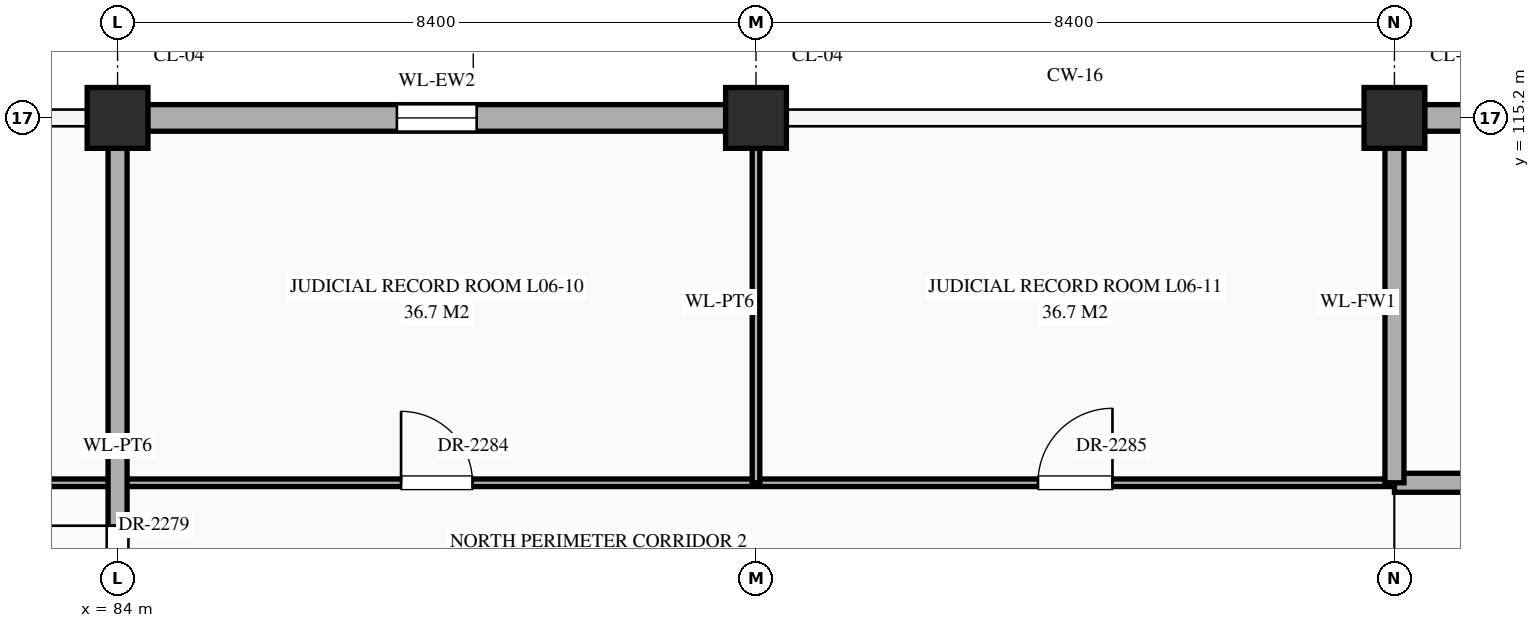
"""IFC4 building model, lengths in metres.
Left out: names, types, materials, properties, quantities, classifications, styles, units other than length and angle.
Written with IfcOpenShell. Run it as: python <this file> out.ifc"""

import sys

from ifc_helpers import new_model, si_unit, direction, frame, frame_2d, origin, origin_2d, place, context, subcontext, project, spatial, rectangle, extrude, element, fill, save


model = new_model("IFC4")
c1 = context("Model", 3, precision=1e-05, world=origin(), true_north=direction((0.0, 1.0)))
c2 = subcontext(c1, "Body", "Model", "MODEL_VIEW")
j1 = project(units=[si_unit("LENGTHUNIT", "METRE"), si_unit("PLANEANGLEUNIT", "RADIAN")], contexts=[c1])
p1 = place(None, origin())
s1 = spatial("IfcSite", under=j1, at=p1, CompositionType="ELEMENT")
p2 = place(p1, origin())
s2 = spatial("IfcBuilding", under=s1, at=p2, CompositionType="ELEMENT")
p3 = place(p2, frame((0.0, 0.0, 26.1)))
s3 = spatial("IfcBuildingStorey", under=s2, at=p3, CompositionType="ELEMENT", Elevation=26.1)
for number, where, z_axis, x_axis in (
    (1, (84.0, 115.2, 0.0), (0.0, 0.0, 1.0), (1.0, 0.0, 0.0)),
    (2, (92.4, 115.2, 0.0), (0.0, 0.0, 1.0), (1.0, 0.0, 0.0)),
    (3, (100.8, 115.2, 0.0), (0.0, 0.0, 1.0), (1.0, 0.0, 0.0)),
):
    element("IfcColumn", number, at=place(p3, frame(where, z_axis=z_axis, x_axis=x_axis)), inside=s3, PredefinedType="COLUMN", context=c2, shape_type="SweptSolid", body=[
        extrude(rectangle(XDim=0.8, YDim=0.8, at=origin_2d()), origin(), (0.0, 0.0, 1.0), 4.5),
    ])
p4 = place(p3, frame((84.395, 115.2, 0.0), z_axis=(0.0, 0.0, 1.0), x_axis=(1.0, 0.0, 0.0)))
e4 = element("IfcWall", 4, at=p4, inside=s3, PredefinedType="STANDARD", context=c2, shape_type="SweptSolid", body=[
    extrude(rectangle(XDim=7.61, YDim=0.35, at=frame_2d((3.805, 0.0))), origin(), (0.0, 0.0, 1.0), 3.59),
])
p5 = place(p4, frame((3.28, 0.0, 0.85)))
e5 = element("IfcOpeningElement", 5, at=p5, cuts=e4, PredefinedType="OPENING", context=c2, shape_type="SweptSolid", body=[
    extrude(rectangle(XDim=1.05, YDim=2.12, at=frame_2d((0.525, 1.06))), frame((0.0, 0.187, 0.0), z_axis=(0.0, -1.0, 0.0), x_axis=(1.0, 0.0, 0.0)), (0.0, 0.0, 1.0), 0.374),
])
p6 = place(p3, frame((101.195, 115.2, 0.0), z_axis=(0.0, 0.0, 1.0), x_axis=(1.0, 0.0, 0.0)))
e6 = element("IfcWall", 6, at=p6, inside=s3, PredefinedType="STANDARD", context=c2, shape_type="SweptSolid", body=[
    extrude(rectangle(XDim=7.61, YDim=0.35, at=frame_2d((3.805, 0.0))), origin(), (0.0, 0.0, 1.0), 3.59),
])
p7 = place(p3, frame((67.2, 110.4, 0.0), z_axis=(0.0, 0.0, 1.0), x_axis=(1.0, 0.0, 0.0)))
e7 = element("IfcWall", 7, at=p7, inside=s3, PredefinedType="STANDARD", context=c2, shape_type="SweptSolid", body=[
    extrude(rectangle(XDim=33.6, YDim=0.1, at=frame_2d((16.8, 0.0))), origin(), (0.0, 0.0, 1.0), 4.24),
])
p8 = place(p7, frame((3.58, 0.0, 0.0)))
e8 = element("IfcOpeningElement", 8, at=p8, cuts=e7, PredefinedType="OPENING", context=c2, shape_type="SweptSolid", body=[
    extrude(rectangle(XDim=1.24, YDim=2.3, at=frame_2d((0.62, 1.15))), frame((0.0, 0.062, 0.0), z_axis=(0.0, -1.0, 0.0), x_axis=(1.0, 0.0, 0.0)), (0.0, 0.0, 1.0), 0.124),
])
p9 = place(p7, frame((11.96, 0.0, 0.0)))
e9 = element("IfcOpeningElement", 9, at=p9, cuts=e7, PredefinedType="OPENING", context=c2, shape_type="SweptSolid", body=[
    extrude(rectangle(XDim=1.28, YDim=2.35, at=frame_2d((0.64, 1.175))), frame((0.0, 0.062, 0.0), z_axis=(0.0, -1.0, 0.0), x_axis=(1.0, 0.0, 0.0)), (0.0, 0.0, 1.0), 0.124),
])
p10 = place(p7, frame((20.53, 0.0, 0.0)))
e10 = element("IfcOpeningElement", 10, at=p10, cuts=e7, PredefinedType="OPENING", context=c2, shape_type="SweptSolid", body=[
    extrude(rectangle(XDim=0.94, YDim=2.3, at=frame_2d((0.47, 1.15))), frame((0.0, 0.062, 0.0), z_axis=(0.0, -1.0, 0.0), x_axis=(1.0, 0.0, 0.0)), (0.0, 0.0, 1.0), 0.124),
])
p11 = place(p7, frame((28.91, 0.0, 0.0)))
e11 = element("IfcOpeningElement", 11, at=p11, cuts=e7, PredefinedType="OPENING", context=c2, shape_type="SweptSolid", body=[
    extrude(rectangle(XDim=0.98, YDim=2.35, at=frame_2d((0.49, 1.175))), frame((0.0, 0.062, 0.0), z_axis=(0.0, -1.0, 0.0), x_axis=(1.0, 0.0, 0.0)), (0.0, 0.0, 1.0), 0.124),
])
p12 = place(p3, frame((100.8, 110.4, 0.0), z_axis=(0.0, 0.0, 1.0), x_axis=(1.0, 0.0, 0.0)))
e12 = element("IfcWall", 12, at=p12, inside=s3, PredefinedType="STANDARD", context=c2, shape_type="SweptSolid", body=[
    extrude(rectangle(XDim=8.4, YDim=0.25, at=frame_2d((4.2, 0.0))), origin(), (0.0, 0.0, 1.0), 4.24),
])
p13 = place(p12, frame((3.65, 0.0, 0.0)))
e13 = element("IfcOpeningElement", 13, at=p13, cuts=e12, PredefinedType="OPENING", context=c2, shape_type="SweptSolid", body=[
    extrude(rectangle(XDim=1.1, YDim=2.2, at=frame_2d((0.55, 1.1))), frame((0.0, 0.137, 0.0), z_axis=(0.0, -1.0, 0.0), x_axis=(1.0, 0.0, 0.0)), (0.0, 0.0, 1.0), 0.274),
])
p14 = place(p3, frame((84.0, 79.24, 0.0), z_axis=(0.0, 0.0, 1.0), x_axis=(0.0, 1.0, 0.0)))
e14 = element("IfcWall", 14, at=p14, inside=s3, PredefinedType="STANDARD", context=c2, shape_type="SweptSolid", body=[
    extrude(rectangle(XDim=35.92, YDim=0.25, at=frame_2d((17.96, 0.0))), origin(), (0.0, 0.0, 1.0), 3.49),
])
p15 = place(p14, frame((22.62, 0.0, 0.0)))
e15 = element("IfcOpeningElement", 15, at=p15, cuts=e14, PredefinedType="OPENING", context=c2, shape_type="SweptSolid", body=[
    extrude(rectangle(XDim=1.8, YDim=2.35, at=frame_2d((0.9, 1.175))), frame((0.0, 0.137, 0.0), z_axis=(0.0, -1.0, 0.0), x_axis=(1.0, 0.0, 0.0)), (0.0, 0.0, 1.0), 0.274),
])
p16 = place(p14, frame((12.5, 0.0, 0.0)))
e16 = element("IfcOpeningElement", 16, at=p16, cuts=e14, PredefinedType="OPENING", context=c2, shape_type="SweptSolid", body=[
    extrude(rectangle(XDim=1.0, YDim=2.2, at=frame_2d((0.5, 1.1))), frame((0.0, 0.137, 0.0), z_axis=(0.0, -1.0, 0.0), x_axis=(1.0, 0.0, 0.0)), (0.0, 0.0, 1.0), 0.274),
])
p17 = place(p14, frame((15.17, 0.0, 0.0)))
e17 = element("IfcOpeningElement", 17, at=p17, cuts=e14, PredefinedType="OPENING", context=c2, shape_type="SweptSolid", body=[
    extrude(rectangle(XDim=1.1, YDim=2.2, at=frame_2d((0.55, 1.1))), frame((0.0, 0.137, 0.0), z_axis=(0.0, -1.0, 0.0), x_axis=(1.0, 0.0, 0.0)), (0.0, 0.0, 1.0), 0.274),
])
p18 = place(p14, frame((26.05, 0.0, 0.0)))
e18 = element("IfcOpeningElement", 18, at=p18, cuts=e14, PredefinedType="OPENING", context=c2, shape_type="SweptSolid", body=[
    extrude(rectangle(XDim=1.5, YDim=2.25, at=frame_2d((0.75, 1.125))), frame((0.0, 0.137, 0.0), z_axis=(0.0, -1.0, 0.0), x_axis=(1.0, 0.0, 0.0)), (0.0, 0.0, 1.0), 0.274),
])
p19 = place(p14, frame((29.645, 0.0, 0.0)))
e19 = element("IfcOpeningElement", 19, at=p19, cuts=e14, PredefinedType="OPENING", context=c2, shape_type="SweptSolid", body=[
    extrude(rectangle(XDim=0.95, YDim=2.15, at=frame_2d((0.475, 1.075))), frame((0.0, 0.137, 0.0), z_axis=(0.0, -1.0, 0.0), x_axis=(1.0, 0.0, 0.0)), (0.0, 0.0, 1.0), 0.274),
])
p20 = place(p14, frame((5.325, 0.0, 0.0)))
e20 = element("IfcOpeningElement", 20, at=p20, cuts=e14, PredefinedType="OPENING", context=c2, shape_type="SweptSolid", body=[
    extrude(rectangle(XDim=0.95, YDim=2.15, at=frame_2d((0.475, 1.075))), frame((0.0, 0.137, 0.0), z_axis=(0.0, -1.0, 0.0), x_axis=(1.0, 0.0, 0.0)), (0.0, 0.0, 1.0), 0.274),
])
p21 = place(p3, frame((92.4, 110.4, 0.0), z_axis=(0.0, 0.0, 1.0), x_axis=(0.0, 1.0, 0.0)))
e21 = element("IfcWall", 21, at=p21, inside=s3, PredefinedType="STANDARD", context=c2, shape_type="SweptSolid", body=[
    extrude(rectangle(XDim=4.76, YDim=0.1, at=frame_2d((2.38, 0.0))), origin(), (0.0, 0.0, 1.0), 3.49),
])
p22 = place(p3, frame((100.8, 110.4, 0.0), z_axis=(0.0, 0.0, 1.0), x_axis=(0.0, 1.0, 0.0)))
e22 = element("IfcWall", 22, at=p22, inside=s3, PredefinedType="STANDARD", context=c2, shape_type="SweptSolid", body=[
    extrude(rectangle(XDim=4.76, YDim=0.25, at=frame_2d((2.38, 0.0))), origin(), (0.0, 0.0, 1.0), 3.49),
])
p23 = place(p5, origin())
e23 = element("IfcWindow", 23, at=p23, inside=s3, PartitioningType="SINGLE_PANEL", PredefinedType="WINDOW", context=c2, shape_type="SweptSolid", body=[
    extrude(rectangle(XDim=1.05, YDim=2.12, at=frame_2d((0.525, 1.06))), frame((0.0, 0.03, 0.0), z_axis=(0.0, -1.0, 0.0), x_axis=(1.0, 0.0, 0.0)), (0.0, 0.0, 1.0), 0.06),
])
fill(e5, e23)
p24 = place(p19, origin())
e24 = element("IfcDoor", 24, at=p24, inside=s3, OperationType="SINGLE_SWING_RIGHT", PredefinedType="DOOR", context=c2, shape_type="SweptSolid", body=[
    extrude(rectangle(XDim=0.95, YDim=2.15, at=frame_2d((0.475, 1.075))), frame((0.0, 0.025, 0.0), z_axis=(0.0, -1.0, 0.0), x_axis=(1.0, 0.0, 0.0)), (0.0, 0.0, 1.0), 0.05),
])
fill(e19, e24)
p25 = place(p10, origin())
e25 = element("IfcDoor", 25, at=p25, inside=s3, OperationType="SINGLE_SWING_LEFT", PredefinedType="DOOR", context=c2, shape_type="SweptSolid", body=[
    extrude(rectangle(XDim=0.94, YDim=2.3, at=frame_2d((0.47, 1.15))), frame((0.0, 0.025, 0.0), z_axis=(0.0, -1.0, 0.0), x_axis=(1.0, 0.0, 0.0)), (0.0, 0.0, 1.0), 0.05),
])
fill(e10, e25)
p26 = place(p11, origin())
e26 = element("IfcDoor", 26, at=p26, inside=s3, OperationType="SINGLE_SWING_RIGHT", PredefinedType="DOOR", context=c2, shape_type="SweptSolid", body=[
    extrude(rectangle(XDim=0.98, YDim=2.35, at=frame_2d((0.49, 1.175))), frame((0.0, 0.025, 0.0), z_axis=(0.0, -1.0, 0.0), x_axis=(1.0, 0.0, 0.0)), (0.0, 0.0, 1.0), 0.05),
])
fill(e11, e26)
save(model, sys.argv[1])
